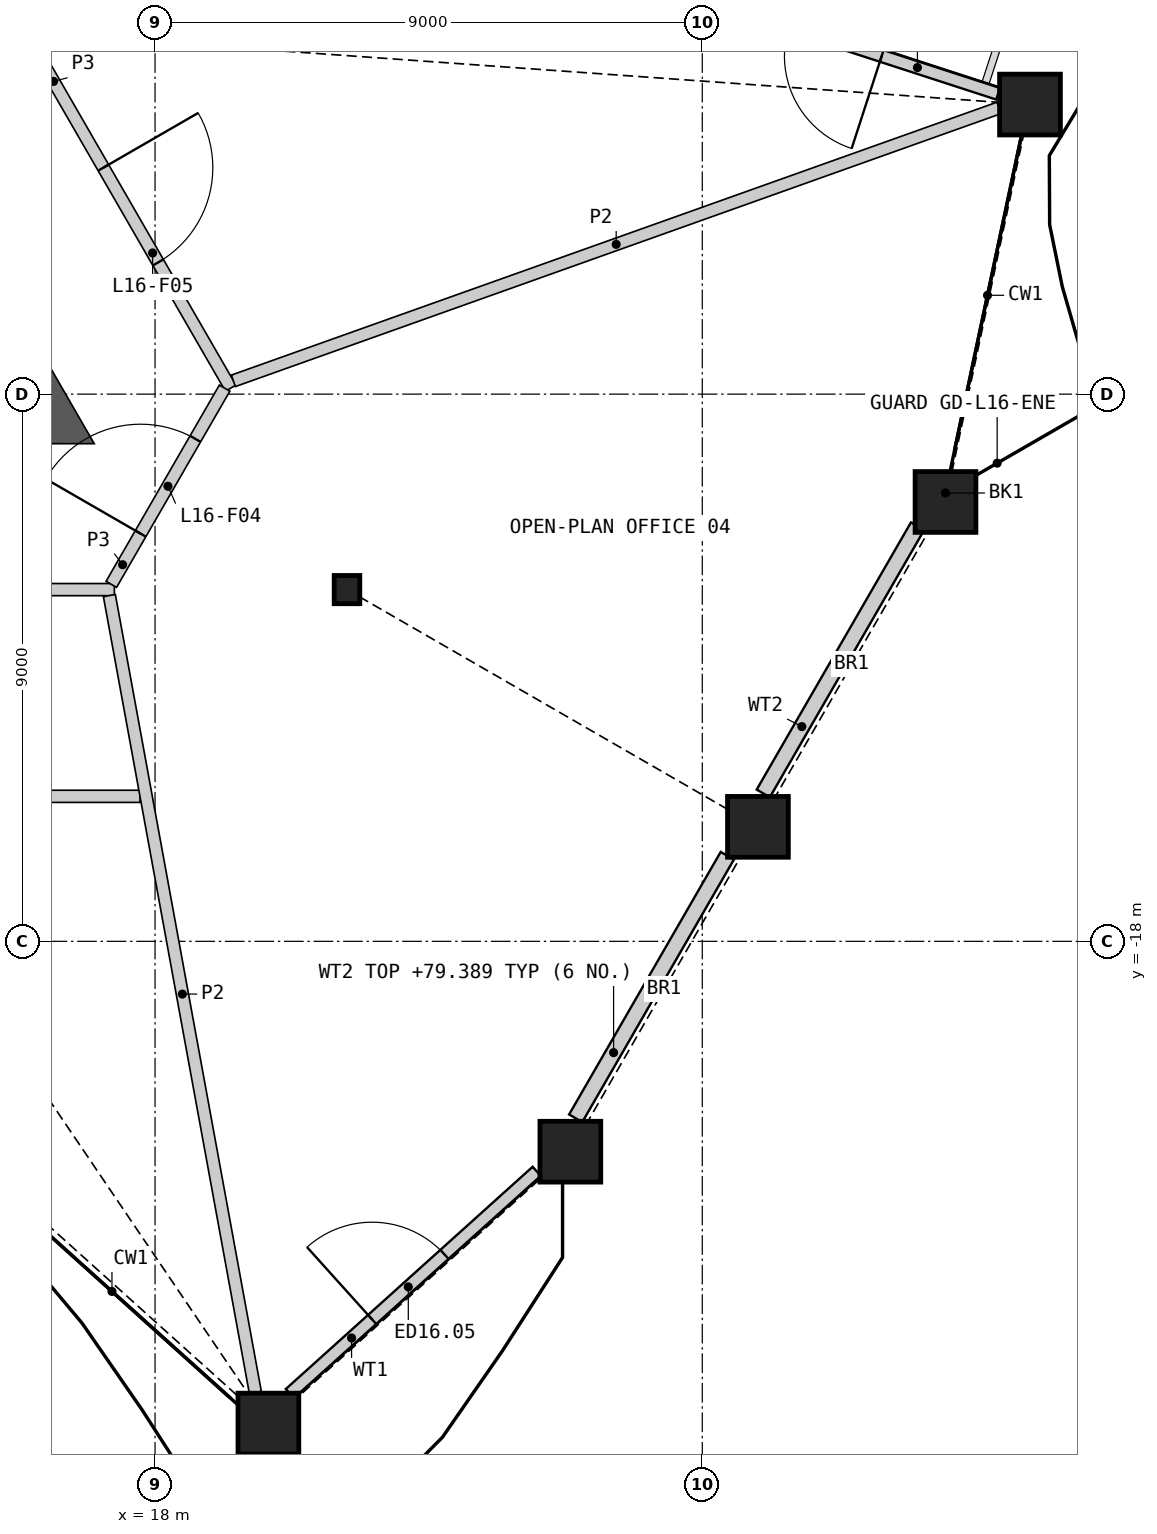
"""IFC4 building model, lengths in metres.
Left out: names, types, materials, properties, quantities, classifications, styles, units other than length and angle.
Written with IfcOpenShell. Run it as: python <this file> out.ifc"""

import sys

from ifc_helpers import new_model, si_unit, direction, frame, frame_2d, origin, origin_2d, place, context, subcontext, project, spatial, polyline, rectangle, hollow_rectangle, i_section, outline, extrude, element, fill, save


model = new_model("IFC4")
c1 = context("Model", 3, precision=1e-05, world=origin(), true_north=direction((0.0, 1.0)))
c2 = subcontext(c1, "Body", "Model", "MODEL_VIEW")
j1 = project(units=[si_unit("LENGTHUNIT", "METRE"), si_unit("PLANEANGLEUNIT", "RADIAN")], contexts=[c1])
p1 = place(None, origin())
s1 = spatial("IfcSite", under=j1, at=p1, CompositionType="ELEMENT")
p2 = place(p1, origin())
s2 = spatial("IfcBuilding", under=s1, at=p2, CompositionType="ELEMENT")
p3 = place(p2, frame((0.0, 0.0, 76.2)))
s3 = spatial("IfcBuildingStorey", under=s2, at=p3, CompositionType="ELEMENT", Elevation=76.2)
for number, where, z_axis, x_axis in (
    (1, (19.864, -25.931, 0.0), (0.0, 0.0, 1.0), (1.0, 0.0, 0.0)),
    (2, (24.83, -21.46, 0.0), (0.0, 0.0, 1.0), (1.0, 0.0, 0.0)),
    (3, (27.915, -16.117, 0.0), (0.0, 0.0, 1.0), (1.0, 0.0, 0.0)),
    (4, (31.0, -10.774, 0.0), (0.0, 0.0, 1.0), (1.0, 0.0, 0.0)),
    (5, (32.389, -4.237, 0.0), (0.0, 0.0, 1.0), (1.0, 0.0, 0.0)),
):
    element("IfcColumn", number, at=place(p3, frame(where, z_axis=z_axis, x_axis=x_axis)), inside=s3, PredefinedType="COLUMN", context=c2, shape_type="SweptSolid", body=[
        extrude(hollow_rectangle(XDim=1.0, YDim=1.0, WallThickness=0.07, at=origin_2d()), origin(), (0.0, 0.0, 1.0), 4.2),
    ])
p4 = place(p3, frame((21.157, -12.215, 0.0), z_axis=(0.0, 0.0, 1.0), x_axis=(1.0, 0.0, 0.0)))
e6 = element("IfcColumn", 6, at=p4, inside=s3, PredefinedType="COLUMN", context=c2, shape_type="SweptSolid", body=[
    extrude(i_section(OverallWidth=0.421, OverallDepth=0.465, WebThickness=0.045, FlangeThickness=0.072, at=origin_2d()), origin(), (0.0, 0.0, 1.0), 4.2),
])
p5 = place(p3, frame((20.217, -25.438, 0.0), z_axis=(0.0, 0.0, 1.0), x_axis=(0.743143013099, 0.669132619204, 0.0)))
e7 = element("IfcWall", 7, at=p5, inside=s3, PredefinedType="SOLIDWALL", context=c2, shape_type="SweptSolid", body=[
    extrude(rectangle(XDim=5.463, YDim=0.2, at=frame_2d((2.731, 0.0))), origin(), (0.0, 0.0, 1.0), 3.189),
])
p6 = place(p5, frame((1.821, 0.0, 0.0)))
e8 = element("IfcOpeningElement", 8, at=p6, cuts=e7, PredefinedType="OPENING", context=c2, shape_type="SweptSolid", body=[
    extrude(rectangle(XDim=1.6, YDim=2.4, at=frame_2d((0.8, 1.2))), frame((0.0, 0.11, 0.0), z_axis=(0.0, -1.0, 0.0), x_axis=(1.0, 0.0, 0.0)), (0.0, 0.0, 1.0), 0.22),
])
p7 = place(p3, frame((24.918, -20.91, 0.0), z_axis=(0.0, 0.0, 1.0), x_axis=(0.499978178329, 0.866038002165, 0.0)))
e9 = element("IfcWall", 9, at=p7, inside=s3, PredefinedType="SOLIDWALL", context=c2, shape_type="SweptSolid", body=[
    extrude(rectangle(XDim=4.986, YDim=0.25, at=frame_2d((2.493, 0.0))), origin(), (0.0, 0.0, 1.0), 3.189),
])
p8 = place(p3, frame((28.003, -15.567, 0.0), z_axis=(0.0, 0.0, 1.0), x_axis=(0.500004250643, 0.866022949661, 0.0)))
e10 = element("IfcWall", 10, at=p8, inside=s3, PredefinedType="SOLIDWALL", context=c2, shape_type="SweptSolid", body=[
    extrude(rectangle(XDim=5.075, YDim=0.25, at=frame_2d((2.537, 0.0))), origin(), (0.0, 0.0, 1.0), 3.189),
])
p9 = place(p3, frame((31.865, -4.06, 0.0), z_axis=(0.0, 0.0, 1.0), x_axis=(-0.951054004345, 0.309024725255, 0.0)))
e11 = element("IfcWall", 11, at=p9, inside=s3, PredefinedType="SOLIDWALL", context=c2, shape_type="SweptSolid", body=[
    extrude(rectangle(XDim=5.579, YDim=0.2, at=frame_2d((2.79, 0.0))), origin(), (0.0, 0.0, 1.0), 3.189),
])
p10 = place(p9, frame((2.012, 0.0, 0.0)))
e12 = element("IfcOpeningElement", 12, at=p10, cuts=e11, PredefinedType="OPENING", context=c2, shape_type="SweptSolid", body=[
    extrude(rectangle(XDim=1.6, YDim=2.4, at=frame_2d((0.8, 1.2))), frame((0.0, 0.11, 0.0), z_axis=(0.0, -1.0, 0.0), x_axis=(1.0, 0.0, 0.0)), (0.0, 0.0, 1.0), 0.22),
])
p11 = place(p3, origin())
e13 = element("IfcWall", 13, at=p11, inside=s3, PredefinedType="SHEAR", context=c2, shape_type="SweptSolid", body=[
    extrude(outline(polyline([(15.441, -9.815), (15.441, -8.915), (16.221, -8.465), (17.0, -9.815), (15.441, -9.815)])), origin(), (0.0, 0.0, 1.0), 3.8),
])
p12 = place(p3, frame((10.821, -12.215, 0.0), z_axis=(0.0, 0.0, 1.0), x_axis=(1.0, 0.0, 0.0)))
e14 = element("IfcWall", 14, at=p12, inside=s3, PredefinedType="PARTITIONING", context=c2, shape_type="SweptSolid", body=[
    extrude(rectangle(XDim=6.51, YDim=0.2, at=frame_2d((3.255, 0.0))), origin(), (0.0, 0.0, 1.0), 3.8),
])
p13 = place(p3, frame((16.008, -3.296, 0.0), z_axis=(0.0, 0.0, 1.0), x_axis=(0.499984737558, -0.86603421538, 0.0)))
e15 = element("IfcWall", 15, at=p13, inside=s3, PredefinedType="PARTITIONING", context=c2, shape_type="SweptSolid", body=[
    extrude(rectangle(XDim=6.473, YDim=0.2, at=frame_2d((3.236, 0.0))), origin(), (0.0, 0.0, 1.0), 3.8),
])
p14 = place(p13, frame((2.285, 0.0, 0.0)))
e16 = element("IfcOpeningElement", 16, at=p14, cuts=e15, PredefinedType="OPENING", context=c2, shape_type="SweptSolid", body=[
    extrude(rectangle(XDim=1.8, YDim=2.1, at=frame_2d((0.9, 1.05))), frame((0.0, 0.11, 0.0), z_axis=(0.0, -1.0, 0.0), x_axis=(1.0, 0.0, 0.0)), (0.0, 0.0, 1.0), 0.22),
])
p15 = place(p3, frame((17.281, -12.128, 0.0), z_axis=(0.0, 0.0, 1.0), x_axis=(0.499958791762, 0.866049194065, 0.0)))
e17 = element("IfcWall", 17, at=p15, inside=s3, PredefinedType="PARTITIONING", context=c2, shape_type="SweptSolid", body=[
    extrude(rectangle(XDim=3.726, YDim=0.2, at=frame_2d((1.863, 0.0))), origin(), (0.0, 0.0, 1.0), 3.8),
])
p16 = place(p15, frame((0.963, 0.0, 0.0)))
e18 = element("IfcOpeningElement", 18, at=p16, cuts=e17, PredefinedType="OPENING", context=c2, shape_type="SweptSolid", body=[
    extrude(rectangle(XDim=1.8, YDim=2.1, at=frame_2d((0.9, 1.05))), frame((0.0, 0.11, 0.0), z_axis=(0.0, -1.0, 0.0), x_axis=(1.0, 0.0, 0.0)), (0.0, 0.0, 1.0), 0.22),
])
p17 = place(p3, frame((0.1, -15.615, 0.0), z_axis=(0.0, 0.0, 1.0), x_axis=(1.0, 0.0, 0.0)))
e19 = element("IfcWall", 19, at=p17, inside=s3, PredefinedType="PARTITIONING", context=c2, shape_type="SweptSolid", body=[
    extrude(rectangle(XDim=17.654, YDim=0.2, at=frame_2d((8.827, 0.0))), origin(), (0.0, 0.0, 1.0), 2.885),
])
p18 = place(p17, frame((8.652, 0.0, 0.0)))
e20 = element("IfcOpeningElement", 20, at=p18, cuts=e19, PredefinedType="OPENING", context=c2, shape_type="SweptSolid", body=[
    extrude(rectangle(XDim=0.95, YDim=2.1, at=frame_2d((0.475, 1.05))), frame((0.0, 0.11, 0.0), z_axis=(0.0, -1.0, 0.0), x_axis=(1.0, 0.0, 0.0)), (0.0, 0.0, 1.0), 0.22),
])
p19 = place(p3, frame((19.288, -8.781, 0.0), z_axis=(0.0, 0.0, 1.0), x_axis=(0.94194008836, 0.33578098508, 0.0)))
e21 = element("IfcWall", 21, at=p19, inside=s3, PredefinedType="PARTITIONING", context=c2, shape_type="SweptSolid", body=[
    extrude(rectangle(XDim=13.367, YDim=0.2, at=frame_2d((6.684, 0.0))), origin(), (0.0, 0.0, 1.0), 2.885),
])
p20 = place(p3, frame((17.249, -12.313, 0.0), z_axis=(0.0, 0.0, 1.0), x_axis=(0.180179866985, -0.983633679544, 0.0)))
e22 = element("IfcWall", 22, at=p20, inside=s3, PredefinedType="PARTITIONING", context=c2, shape_type="SweptSolid", body=[
    extrude(rectangle(XDim=13.326, YDim=0.2, at=frame_2d((6.663, 0.0))), origin(), (0.0, 0.0, 1.0), 2.885),
])
p21 = place(p6, origin())
e23 = element("IfcDoor", 23, at=p21, inside=s3, OperationType="DOUBLE_DOOR_SINGLE_SWING", PredefinedType="DOOR", context=c2, shape_type="SweptSolid", body=[
    extrude(rectangle(XDim=1.6, YDim=2.4, at=frame_2d((0.8, 1.2))), frame((0.0, 0.025, 0.0), z_axis=(0.0, -1.0, 0.0), x_axis=(1.0, 0.0, 0.0)), (0.0, 0.0, 1.0), 0.05),
])
fill(e8, e23)
p22 = place(p10, origin())
e24 = element("IfcDoor", 24, at=p22, inside=s3, OperationType="DOUBLE_DOOR_SINGLE_SWING", PredefinedType="DOOR", context=c2, shape_type="SweptSolid", body=[
    extrude(rectangle(XDim=1.6, YDim=2.4, at=frame_2d((0.8, 1.2))), frame((0.0, 0.025, 0.0), z_axis=(0.0, -1.0, 0.0), x_axis=(1.0, 0.0, 0.0)), (0.0, 0.0, 1.0), 0.05),
])
fill(e12, e24)
p23 = place(p16, origin())
e25 = element("IfcDoor", 25, at=p23, inside=s3, OperationType="DOUBLE_DOOR_SINGLE_SWING", PredefinedType="DOOR", context=c2, shape_type="SweptSolid", body=[
    extrude(rectangle(XDim=1.8, YDim=2.1, at=frame_2d((0.9, 1.05))), frame((0.0, 0.025, 0.0), z_axis=(0.0, -1.0, 0.0), x_axis=(1.0, 0.0, 0.0)), (0.0, 0.0, 1.0), 0.05),
])
fill(e18, e25)
p24 = place(p14, origin())
e26 = element("IfcDoor", 26, at=p24, inside=s3, OperationType="DOUBLE_DOOR_SINGLE_SWING", PredefinedType="DOOR", context=c2, shape_type="SweptSolid", body=[
    extrude(rectangle(XDim=1.8, YDim=2.1, at=frame_2d((0.9, 1.05))), frame((0.0, 0.025, 0.0), z_axis=(0.0, -1.0, 0.0), x_axis=(1.0, 0.0, 0.0)), (0.0, 0.0, 1.0), 0.05),
])
fill(e16, e26)
save(model, sys.argv[1])
